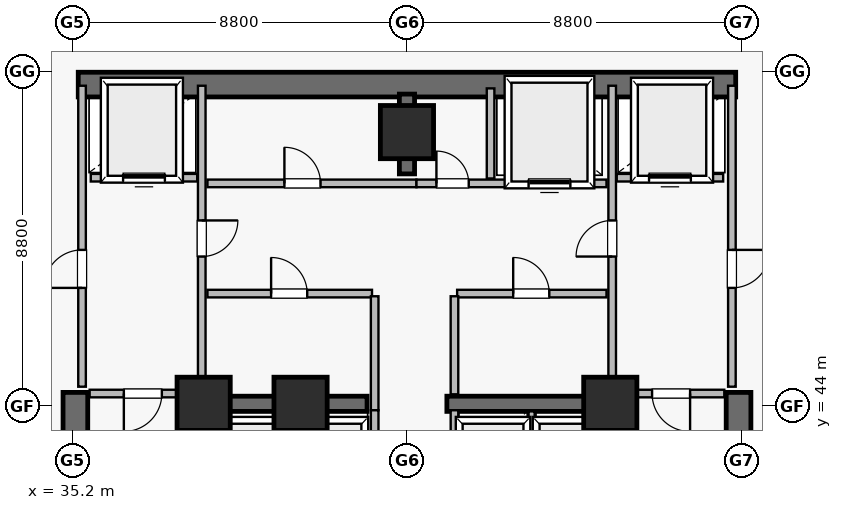
"""IFC4 building model, lengths in metres.
Left out: names, types, materials, properties, quantities, classifications, styles, units other than length and angle.
Written with IfcOpenShell. Run it as: python <this file> out.ifc"""

import sys

from ifc_helpers import new_model, si_unit, direction, frame, frame_2d, origin, origin_2d, place, context, subcontext, project, spatial, rectangle, extrude, element, fill, save


model = new_model("IFC4")
c1 = context("Model", 3, precision=1e-05, world=origin(), true_north=direction((0.0, 1.0)))
c2 = subcontext(c1, "Body", "Model", "MODEL_VIEW")
j1 = project(units=[si_unit("LENGTHUNIT", "METRE"), si_unit("PLANEANGLEUNIT", "RADIAN")], contexts=[c1])
p1 = place(None, origin())
s1 = spatial("IfcSite", under=j1, at=p1, CompositionType="ELEMENT")
p2 = place(p1, origin())
s2 = spatial("IfcBuilding", under=s1, at=p2, CompositionType="ELEMENT")
p3 = place(p2, frame((0.0, 0.0, -7.8)))
s3 = spatial("IfcBuildingStorey", under=s2, at=p3, CompositionType="ELEMENT", Elevation=-7.8)
p4 = place(p3, frame((35.35, 52.45, 0.0), z_axis=(0.0, 0.0, 1.0), x_axis=(1.0, 0.0, 0.0)))
e1 = element("IfcWall", 1, at=p4, inside=s3, PredefinedType="SHEAR", context=c2, shape_type="SweptSolid", body=[
    extrude(rectangle(XDim=17.3, YDim=0.65, at=frame_2d((8.65, 0.0))), origin(), (0.0, 0.0, 1.0), 3.58),
])
for number, where, z_axis, x_axis in (
    (2, (35.275, 34.95, 0.0), (0.0, 0.0, 1.0), (0.0, 1.0, 0.0)),
    (3, (52.725, 34.95, 0.0), (0.0, 0.0, 1.0), (0.0, 1.0, 0.0)),
):
    element("IfcWall", number, at=place(p3, frame(where, z_axis=z_axis, x_axis=x_axis)), inside=s3, PredefinedType="SHEAR", context=c2, shape_type="SweptSolid", body=[
        extrude(rectangle(XDim=9.4, YDim=0.65, at=frame_2d((4.7, 0.0))), origin(), (0.0, 0.0, 1.0), 3.58),
    ])
for number, where, z_axis, x_axis in (
    (4, (38.775, 35.4, 0.0), (0.0, 0.0, 1.0), (0.0, 1.0, 0.0)),
    (5, (49.225, 35.4, 0.0), (0.0, 0.0, 1.0), (0.0, 1.0, 0.0)),
):
    element("IfcWall", number, at=place(p3, frame(where, z_axis=z_axis, x_axis=x_axis)), inside=s3, PredefinedType="SHEAR", context=c2, shape_type="SweptSolid", body=[
        extrude(rectangle(XDim=8.95, YDim=0.65, at=frame_2d((4.475, 0.0))), origin(), (0.0, 0.0, 1.0), 3.58),
    ])
p5 = place(p3, frame((44.0, 50.1, 0.0), z_axis=(0.0, 0.0, 1.0), x_axis=(0.0, 1.0, 0.0)))
e6 = element("IfcWall", 6, at=p5, inside=s3, PredefinedType="SHEAR", context=c2, shape_type="SweptSolid", body=[
    extrude(rectangle(XDim=2.1, YDim=0.4, at=frame_2d((1.05, 0.0))), origin(), (0.0, 0.0, 1.0), 3.58),
])
for number, where, z_axis, x_axis in (
    (7, (38.75, 44.05, 0.0), (0.0, 0.0, 1.0), (1.0, 0.0, 0.0)),
    (8, (45.05, 44.05, 0.0), (0.0, 0.0, 1.0), (1.0, 0.0, 0.0)),
):
    element("IfcWall", number, at=place(p3, frame(where, z_axis=z_axis, x_axis=x_axis)), inside=s3, PredefinedType="SHEAR", context=c2, shape_type="SweptSolid", body=[
        extrude(rectangle(XDim=4.2, YDim=0.4, at=frame_2d((2.1, 0.0))), origin(), (0.0, 0.0, 1.0), 3.58),
    ])
for number, where, z_axis, x_axis in (
    (9, (38.65, 44.05, 0.0), (0.0, 0.0, 1.0), (1.0, 0.0, 0.0)),
    (10, (49.35, 44.05, 0.0), (0.0, 0.0, 1.0), (1.0, 0.0, 0.0)),
    (11, (44.0, 51.2, 0.0), (0.0, 0.0, 1.0), (1.0, 0.0, 0.0)),
    (12, (41.2, 44.05, 0.0), (0.0, 0.0, 1.0), (1.0, 0.0, 0.0)),
):
    element("IfcColumn", number, at=place(p3, frame(where, z_axis=z_axis, x_axis=x_axis)), inside=s3, PredefinedType="COLUMN", context=c2, shape_type="SweptSolid", body=[
        extrude(rectangle(XDim=1.4, YDim=1.4, at=origin_2d()), origin(), (0.0, 0.0, 1.0), 3.9),
    ])
p6 = place(p3, frame((35.45, 44.5, 0.0), z_axis=(0.0, 0.0, 1.0), x_axis=(0.0, 1.0, 0.0)))
e13 = element("IfcWall", 13, at=p6, inside=s3, PredefinedType="SOLIDWALL", context=c2, shape_type="SweptSolid", body=[
    extrude(rectangle(XDim=7.92, YDim=0.2, at=frame_2d((3.96, 0.0))), origin(), (0.0, 0.0, 1.0), 3.58),
])
p7 = place(p6, frame((2.6, 0.0, 0.0)))
e14 = element("IfcOpeningElement", 14, at=p7, cuts=e13, PredefinedType="OPENING", context=c2, shape_type="SweptSolid", body=[
    extrude(rectangle(XDim=1.0, YDim=2.15, at=frame_2d((0.5, 1.075))), frame((0.0, 0.11, 0.0), z_axis=(0.0, -1.0, 0.0), x_axis=(1.0, 0.0, 0.0)), (0.0, 0.0, 1.0), 0.22),
])
p8 = place(p3, frame((52.55, 44.5, 0.0), z_axis=(0.0, 0.0, 1.0), x_axis=(0.0, 1.0, 0.0)))
e15 = element("IfcWall", 15, at=p8, inside=s3, PredefinedType="SOLIDWALL", context=c2, shape_type="SweptSolid", body=[
    extrude(rectangle(XDim=7.92, YDim=0.2, at=frame_2d((3.96, 0.0))), origin(), (0.0, 0.0, 1.0), 3.58),
])
p9 = place(p8, frame((2.6, 0.0, 0.0)))
e16 = element("IfcOpeningElement", 16, at=p9, cuts=e15, PredefinedType="OPENING", context=c2, shape_type="SweptSolid", body=[
    extrude(rectangle(XDim=1.0, YDim=2.15, at=frame_2d((0.5, 1.075))), frame((0.0, 0.11, 0.0), z_axis=(0.0, -1.0, 0.0), x_axis=(1.0, 0.0, 0.0)), (0.0, 0.0, 1.0), 0.22),
])
p10 = place(p3, frame((38.6, 44.5, 0.0), z_axis=(0.0, 0.0, 1.0), x_axis=(0.0, 1.0, 0.0)))
e17 = element("IfcWall", 17, at=p10, inside=s3, PredefinedType="SOLIDWALL", context=c2, shape_type="SweptSolid", body=[
    extrude(rectangle(XDim=7.92, YDim=0.2, at=frame_2d((3.96, 0.0))), origin(), (0.0, 0.0, 1.0), 3.58),
])
p11 = place(p10, frame((3.425, 0.0, 0.0)))
e18 = element("IfcOpeningElement", 18, at=p11, cuts=e17, PredefinedType="OPENING", context=c2, shape_type="SweptSolid", body=[
    extrude(rectangle(XDim=0.95, YDim=2.15, at=frame_2d((0.475, 1.075))), frame((0.0, 0.11, 0.0), z_axis=(0.0, -1.0, 0.0), x_axis=(1.0, 0.0, 0.0)), (0.0, 0.0, 1.0), 0.22),
])
p12 = place(p3, frame((49.4, 44.5, 0.0), z_axis=(0.0, 0.0, 1.0), x_axis=(0.0, 1.0, 0.0)))
e19 = element("IfcWall", 19, at=p12, inside=s3, PredefinedType="SOLIDWALL", context=c2, shape_type="SweptSolid", body=[
    extrude(rectangle(XDim=7.92, YDim=0.2, at=frame_2d((3.96, 0.0))), origin(), (0.0, 0.0, 1.0), 3.58),
])
p13 = place(p12, frame((3.425, 0.0, 0.0)))
e20 = element("IfcOpeningElement", 20, at=p13, cuts=e19, PredefinedType="OPENING", context=c2, shape_type="SweptSolid", body=[
    extrude(rectangle(XDim=0.95, YDim=2.15, at=frame_2d((0.475, 1.075))), frame((0.0, 0.11, 0.0), z_axis=(0.0, -1.0, 0.0), x_axis=(1.0, 0.0, 0.0)), (0.0, 0.0, 1.0), 0.22),
])
p14 = place(p3, frame((38.75, 49.85, 0.0), z_axis=(0.0, 0.0, 1.0), x_axis=(1.0, 0.0, 0.0)))
e21 = element("IfcWall", 21, at=p14, inside=s3, PredefinedType="SOLIDWALL", context=c2, shape_type="SweptSolid", body=[
    extrude(rectangle(XDim=5.5, YDim=0.2, at=frame_2d((2.75, 0.0))), origin(), (0.0, 0.0, 1.0), 3.58),
])
p15 = place(p14, frame((2.025, 0.0, 0.0)))
e22 = element("IfcOpeningElement", 22, at=p15, cuts=e21, PredefinedType="OPENING", context=c2, shape_type="SweptSolid", body=[
    extrude(rectangle(XDim=0.95, YDim=2.15, at=frame_2d((0.475, 1.075))), frame((0.0, 0.11, 0.0), z_axis=(0.0, -1.0, 0.0), x_axis=(1.0, 0.0, 0.0)), (0.0, 0.0, 1.0), 0.22),
])
p16 = place(p3, frame((44.25, 49.85, 0.0), z_axis=(0.0, 0.0, 1.0), x_axis=(1.0, 0.0, 0.0)))
e23 = element("IfcWall", 23, at=p16, inside=s3, PredefinedType="SOLIDWALL", context=c2, shape_type="SweptSolid", body=[
    extrude(rectangle(XDim=5.0, YDim=0.2, at=frame_2d((2.5, 0.0))), origin(), (0.0, 0.0, 1.0), 2.918),
])
p17 = place(p16, frame((0.525, 0.0, 0.0)))
e24 = element("IfcOpeningElement", 24, at=p17, cuts=e23, PredefinedType="OPENING", context=c2, shape_type="SweptSolid", body=[
    extrude(rectangle(XDim=0.85, YDim=2.1, at=frame_2d((0.425, 1.05))), frame((0.0, 0.11, 0.0), z_axis=(0.0, -1.0, 0.0), x_axis=(1.0, 0.0, 0.0)), (0.0, 0.0, 1.0), 0.22),
])
p18 = place(p16, frame((2.95, 0.0, 0.0)))
e25 = element("IfcOpeningElement", 25, at=p18, cuts=e23, PredefinedType="OPENING", context=c2, shape_type="SweptSolid", body=[
    extrude(rectangle(XDim=1.1, YDim=2.15, at=frame_2d((0.55, 1.075))), frame((0.0, 0.11, 0.0), z_axis=(0.0, -1.0, 0.0), x_axis=(1.0, 0.0, 0.0)), (0.0, 0.0, 1.0), 0.22),
])
p19 = place(p3, frame((38.75, 46.95, 0.0), z_axis=(0.0, 0.0, 1.0), x_axis=(1.0, 0.0, 0.0)))
e26 = element("IfcWall", 26, at=p19, inside=s3, PredefinedType="SOLIDWALL", context=c2, shape_type="SweptSolid", body=[
    extrude(rectangle(XDim=4.33, YDim=0.2, at=frame_2d((2.165, 0.0))), origin(), (0.0, 0.0, 1.0), 3.58),
])
p20 = place(p19, frame((1.675, 0.0, 0.0)))
e27 = element("IfcOpeningElement", 27, at=p20, cuts=e26, PredefinedType="OPENING", context=c2, shape_type="SweptSolid", body=[
    extrude(rectangle(XDim=0.95, YDim=2.15, at=frame_2d((0.475, 1.075))), frame((0.0, 0.11, 0.0), z_axis=(0.0, -1.0, 0.0), x_axis=(1.0, 0.0, 0.0)), (0.0, 0.0, 1.0), 0.22),
])
p21 = place(p3, frame((45.32, 46.95, 0.0), z_axis=(0.0, 0.0, 1.0), x_axis=(1.0, 0.0, 0.0)))
e28 = element("IfcWall", 28, at=p21, inside=s3, PredefinedType="SOLIDWALL", context=c2, shape_type="SweptSolid", body=[
    extrude(rectangle(XDim=3.93, YDim=0.2, at=frame_2d((1.965, 0.0))), origin(), (0.0, 0.0, 1.0), 2.918),
])
p22 = place(p21, frame((1.475, 0.0, 0.0)))
e29 = element("IfcOpeningElement", 29, at=p22, cuts=e28, PredefinedType="OPENING", context=c2, shape_type="SweptSolid", body=[
    extrude(rectangle(XDim=0.95, YDim=2.15, at=frame_2d((0.475, 1.075))), frame((0.0, 0.11, 0.0), z_axis=(0.0, -1.0, 0.0), x_axis=(1.0, 0.0, 0.0)), (0.0, 0.0, 1.0), 0.22),
])
p23 = place(p3, frame((35.65, 44.32, 0.0), z_axis=(0.0, 0.0, 1.0), x_axis=(1.0, 0.0, 0.0)))
e30 = element("IfcWall", 30, at=p23, inside=s3, PredefinedType="SOLIDWALL", context=c2, shape_type="SweptSolid", body=[
    extrude(rectangle(XDim=2.8, YDim=0.2, at=frame_2d((1.4, 0.0))), origin(), (0.0, 0.0, 1.0), 3.58),
])
p24 = place(p23, frame((0.9, 0.0, 0.0)))
e31 = element("IfcOpeningElement", 31, at=p24, cuts=e30, PredefinedType="OPENING", context=c2, shape_type="SweptSolid", body=[
    extrude(rectangle(XDim=1.0, YDim=2.15, at=frame_2d((0.5, 1.075))), frame((0.0, 0.11, 0.0), z_axis=(0.0, -1.0, 0.0), x_axis=(1.0, 0.0, 0.0)), (0.0, 0.0, 1.0), 0.22),
])
p25 = place(p3, frame((49.55, 44.32, 0.0), z_axis=(0.0, 0.0, 1.0), x_axis=(1.0, 0.0, 0.0)))
e32 = element("IfcWall", 32, at=p25, inside=s3, PredefinedType="SOLIDWALL", context=c2, shape_type="SweptSolid", body=[
    extrude(rectangle(XDim=2.8, YDim=0.2, at=frame_2d((1.4, 0.0))), origin(), (0.0, 0.0, 1.0), 3.58),
])
p26 = place(p25, frame((0.9, 0.0, 0.0)))
e33 = element("IfcOpeningElement", 33, at=p26, cuts=e32, PredefinedType="OPENING", context=c2, shape_type="SweptSolid", body=[
    extrude(rectangle(XDim=1.0, YDim=2.15, at=frame_2d((0.5, 1.075))), frame((0.0, 0.11, 0.0), z_axis=(0.0, -1.0, 0.0), x_axis=(1.0, 0.0, 0.0)), (0.0, 0.0, 1.0), 0.22),
])
p27 = place(p3, frame((35.68, 50.0, 0.0), z_axis=(0.0, 0.0, 1.0), x_axis=(1.0, 0.0, 0.0)))
e34 = element("IfcWall", 34, at=p27, inside=s3, PredefinedType="SOLIDWALL", context=c2, shape_type="SweptSolid", body=[
    extrude(rectangle(XDim=2.8, YDim=0.2, at=frame_2d((1.4, 0.0))), origin(), (0.0, 0.0, 1.0), 3.58),
])
p28 = place(p27, frame((0.85, 0.0, 0.0)))
e35 = element("IfcOpeningElement", 35, at=p28, cuts=e34, PredefinedType="OPENING", context=c2, shape_type="SweptSolid", body=[
    extrude(rectangle(XDim=1.1, YDim=2.15, at=frame_2d((0.55, 1.075))), frame((0.0, 0.11, 0.0), z_axis=(0.0, -1.0, 0.0), x_axis=(1.0, 0.0, 0.0)), (0.0, 0.0, 1.0), 0.22),
])
p29 = place(p3, frame((49.52, 50.0, 0.0), z_axis=(0.0, 0.0, 1.0), x_axis=(1.0, 0.0, 0.0)))
e36 = element("IfcWall", 36, at=p29, inside=s3, PredefinedType="SOLIDWALL", context=c2, shape_type="SweptSolid", body=[
    extrude(rectangle(XDim=2.8, YDim=0.2, at=frame_2d((1.4, 0.0))), origin(), (0.0, 0.0, 1.0), 3.58),
])
p30 = place(p29, frame((0.85, 0.0, 0.0)))
e37 = element("IfcOpeningElement", 37, at=p30, cuts=e36, PredefinedType="OPENING", context=c2, shape_type="SweptSolid", body=[
    extrude(rectangle(XDim=1.1, YDim=2.15, at=frame_2d((0.55, 1.075))), frame((0.0, 0.11, 0.0), z_axis=(0.0, -1.0, 0.0), x_axis=(1.0, 0.0, 0.0)), (0.0, 0.0, 1.0), 0.22),
])
p31 = place(p3, frame((43.15, 43.88, 0.0), z_axis=(0.0, 0.0, 1.0), x_axis=(0.0, 1.0, 0.0)))
e38 = element("IfcWall", 38, at=p31, inside=s3, PredefinedType="SOLIDWALL", context=c2, shape_type="SweptSolid", body=[
    extrude(rectangle(XDim=3.0, YDim=0.2, at=frame_2d((1.5, 0.0))), origin(), (0.0, 0.0, 1.0), 3.58),
])
p32 = place(p3, frame((45.25, 44.3, 0.0), z_axis=(0.0, 0.0, 1.0), x_axis=(0.0, 1.0, 0.0)))
e39 = element("IfcWall", 39, at=p32, inside=s3, PredefinedType="SOLIDWALL", context=c2, shape_type="SweptSolid", body=[
    extrude(rectangle(XDim=2.58, YDim=0.2, at=frame_2d((1.29, 0.0))), origin(), (0.0, 0.0, 1.0), 3.58),
])
for number, where, z_axis, x_axis in (
    (40, (43.15, 41.32, 0.0), (0.0, 0.0, 1.0), (0.0, 1.0, 0.0)),
    (41, (45.25, 41.32, 0.0), (0.0, 0.0, 1.0), (0.0, 1.0, 0.0)),
):
    element("IfcWall", number, at=place(p3, frame(where, z_axis=z_axis, x_axis=x_axis)), inside=s3, PredefinedType="SOLIDWALL", context=c2, shape_type="SweptSolid", body=[
        extrude(rectangle(XDim=2.56, YDim=0.2, at=frame_2d((1.28, 0.0))), origin(), (0.0, 0.0, 1.0), 3.58),
    ])
for number, where, z_axis, x_axis in (
    (42, (40.9, 41.32, 0.0), (0.0, 0.0, 1.0), (0.0, 1.0, 0.0)),
    (43, (47.28, 41.32, 0.0), (0.0, 0.0, 1.0), (0.0, 1.0, 0.0)),
):
    element("IfcWall", number, at=place(p3, frame(where, z_axis=z_axis, x_axis=x_axis)), inside=s3, PredefinedType="SOLIDWALL", context=c2, shape_type="SweptSolid", body=[
        extrude(rectangle(XDim=2.53, YDim=0.16, at=frame_2d((1.265, 0.0))), origin(), (0.0, 0.0, 1.0), 3.58),
    ])
p33 = place(p3, frame((46.2, 49.98, 0.0), z_axis=(0.0, 0.0, 1.0), x_axis=(0.0, 1.0, 0.0)))
e44 = element("IfcWall", 44, at=p33, inside=s3, PredefinedType="SOLIDWALL", context=c2, shape_type="SweptSolid", body=[
    extrude(rectangle(XDim=2.37, YDim=0.2, at=frame_2d((1.185, 0.0))), origin(), (0.0, 0.0, 1.0), 3.58),
])
p34 = place(p24, frame((1.0, 0.0, 0.0), z_axis=(0.0, 0.0, 1.0), x_axis=(-1.0, 0.0, 0.0)))
e45 = element("IfcDoor", 45, at=p34, inside=s3, OperationType="SINGLE_SWING_LEFT", PredefinedType="DOOR", context=c2, shape_type="SweptSolid", body=[
    extrude(rectangle(XDim=1.0, YDim=2.15, at=frame_2d((0.5, 1.075))), frame((0.0, 0.025, 0.0), z_axis=(0.0, -1.0, 0.0), x_axis=(1.0, 0.0, 0.0)), (0.0, 0.0, 1.0), 0.05),
])
fill(e31, e45)
p35 = place(p26, frame((1.0, 0.0, 0.0), z_axis=(0.0, 0.0, 1.0), x_axis=(-1.0, 0.0, 0.0)))
e46 = element("IfcDoor", 46, at=p35, inside=s3, OperationType="SINGLE_SWING_RIGHT", PredefinedType="DOOR", context=c2, shape_type="SweptSolid", body=[
    extrude(rectangle(XDim=1.0, YDim=2.15, at=frame_2d((0.5, 1.075))), frame((0.0, 0.025, 0.0), z_axis=(0.0, -1.0, 0.0), x_axis=(1.0, 0.0, 0.0)), (0.0, 0.0, 1.0), 0.05),
])
fill(e33, e46)
p36 = place(p7, origin())
e47 = element("IfcDoor", 47, at=p36, inside=s3, OperationType="SINGLE_SWING_LEFT", PredefinedType="DOOR", context=c2, shape_type="SweptSolid", body=[
    extrude(rectangle(XDim=1.0, YDim=2.15, at=frame_2d((0.5, 1.075))), frame((0.0, 0.025, 0.0), z_axis=(0.0, -1.0, 0.0), x_axis=(1.0, 0.0, 0.0)), (0.0, 0.0, 1.0), 0.05),
])
fill(e14, e47)
p37 = place(p9, frame((1.0, 0.0, 0.0), z_axis=(0.0, 0.0, 1.0), x_axis=(-1.0, 0.0, 0.0)))
e48 = element("IfcDoor", 48, at=p37, inside=s3, OperationType="SINGLE_SWING_RIGHT", PredefinedType="DOOR", context=c2, shape_type="SweptSolid", body=[
    extrude(rectangle(XDim=1.0, YDim=2.15, at=frame_2d((0.5, 1.075))), frame((0.0, 0.025, 0.0), z_axis=(0.0, -1.0, 0.0), x_axis=(1.0, 0.0, 0.0)), (0.0, 0.0, 1.0), 0.05),
])
fill(e16, e48)
p38 = place(p11, frame((0.95, 0.0, 0.0), z_axis=(0.0, 0.0, 1.0), x_axis=(-1.0, 0.0, 0.0)))
e49 = element("IfcDoor", 49, at=p38, inside=s3, OperationType="SINGLE_SWING_RIGHT", PredefinedType="DOOR", context=c2, shape_type="SweptSolid", body=[
    extrude(rectangle(XDim=0.95, YDim=2.15, at=frame_2d((0.475, 1.075))), frame((0.0, 0.025, 0.0), z_axis=(0.0, -1.0, 0.0), x_axis=(1.0, 0.0, 0.0)), (0.0, 0.0, 1.0), 0.05),
])
fill(e18, e49)
p39 = place(p13, origin())
e50 = element("IfcDoor", 50, at=p39, inside=s3, OperationType="SINGLE_SWING_LEFT", PredefinedType="DOOR", context=c2, shape_type="SweptSolid", body=[
    extrude(rectangle(XDim=0.95, YDim=2.15, at=frame_2d((0.475, 1.075))), frame((0.0, 0.025, 0.0), z_axis=(0.0, -1.0, 0.0), x_axis=(1.0, 0.0, 0.0)), (0.0, 0.0, 1.0), 0.05),
])
fill(e20, e50)
p40 = place(p28, origin())
e51 = element("IfcDoor", 51, at=p40, inside=s3, OperationType="SLIDING_TO_LEFT", PredefinedType="DOOR", context=c2, shape_type="SweptSolid", body=[
    extrude(rectangle(XDim=1.1, YDim=2.15, at=frame_2d((0.55, 1.075))), frame((0.0, 0.025, 0.0), z_axis=(0.0, -1.0, 0.0), x_axis=(1.0, 0.0, 0.0)), (0.0, 0.0, 1.0), 0.05),
])
fill(e35, e51)
p41 = place(p30, origin())
e52 = element("IfcDoor", 52, at=p41, inside=s3, OperationType="SLIDING_TO_LEFT", PredefinedType="DOOR", context=c2, shape_type="SweptSolid", body=[
    extrude(rectangle(XDim=1.1, YDim=2.15, at=frame_2d((0.55, 1.075))), frame((0.0, 0.025, 0.0), z_axis=(0.0, -1.0, 0.0), x_axis=(1.0, 0.0, 0.0)), (0.0, 0.0, 1.0), 0.05),
])
fill(e37, e52)
p42 = place(p15, origin())
e53 = element("IfcDoor", 53, at=p42, inside=s3, OperationType="SINGLE_SWING_LEFT", PredefinedType="DOOR", context=c2, shape_type="SweptSolid", body=[
    extrude(rectangle(XDim=0.95, YDim=2.15, at=frame_2d((0.475, 1.075))), frame((0.0, 0.025, 0.0), z_axis=(0.0, -1.0, 0.0), x_axis=(1.0, 0.0, 0.0)), (0.0, 0.0, 1.0), 0.05),
])
fill(e22, e53)
p43 = place(p17, origin())
e54 = element("IfcDoor", 54, at=p43, inside=s3, OperationType="SINGLE_SWING_LEFT", PredefinedType="DOOR", context=c2, shape_type="SweptSolid", body=[
    extrude(rectangle(XDim=0.85, YDim=2.1, at=frame_2d((0.425, 1.05))), frame((0.0, 0.025, 0.0), z_axis=(0.0, -1.0, 0.0), x_axis=(1.0, 0.0, 0.0)), (0.0, 0.0, 1.0), 0.05),
])
fill(e24, e54)
p44 = place(p18, origin())
e55 = element("IfcDoor", 55, at=p44, inside=s3, OperationType="SLIDING_TO_LEFT", PredefinedType="DOOR", context=c2, shape_type="SweptSolid", body=[
    extrude(rectangle(XDim=1.1, YDim=2.15, at=frame_2d((0.55, 1.075))), frame((0.0, 0.025, 0.0), z_axis=(0.0, -1.0, 0.0), x_axis=(1.0, 0.0, 0.0)), (0.0, 0.0, 1.0), 0.05),
])
fill(e25, e55)
p45 = place(p20, origin())
e56 = element("IfcDoor", 56, at=p45, inside=s3, OperationType="SINGLE_SWING_LEFT", PredefinedType="DOOR", context=c2, shape_type="SweptSolid", body=[
    extrude(rectangle(XDim=0.95, YDim=2.15, at=frame_2d((0.475, 1.075))), frame((0.0, 0.025, 0.0), z_axis=(0.0, -1.0, 0.0), x_axis=(1.0, 0.0, 0.0)), (0.0, 0.0, 1.0), 0.05),
])
fill(e27, e56)
p46 = place(p22, origin())
e57 = element("IfcDoor", 57, at=p46, inside=s3, OperationType="SINGLE_SWING_LEFT", PredefinedType="DOOR", context=c2, shape_type="SweptSolid", body=[
    extrude(rectangle(XDim=0.95, YDim=2.15, at=frame_2d((0.475, 1.075))), frame((0.0, 0.025, 0.0), z_axis=(0.0, -1.0, 0.0), x_axis=(1.0, 0.0, 0.0)), (0.0, 0.0, 1.0), 0.05),
])
fill(e29, e57)
save(model, sys.argv[1])
